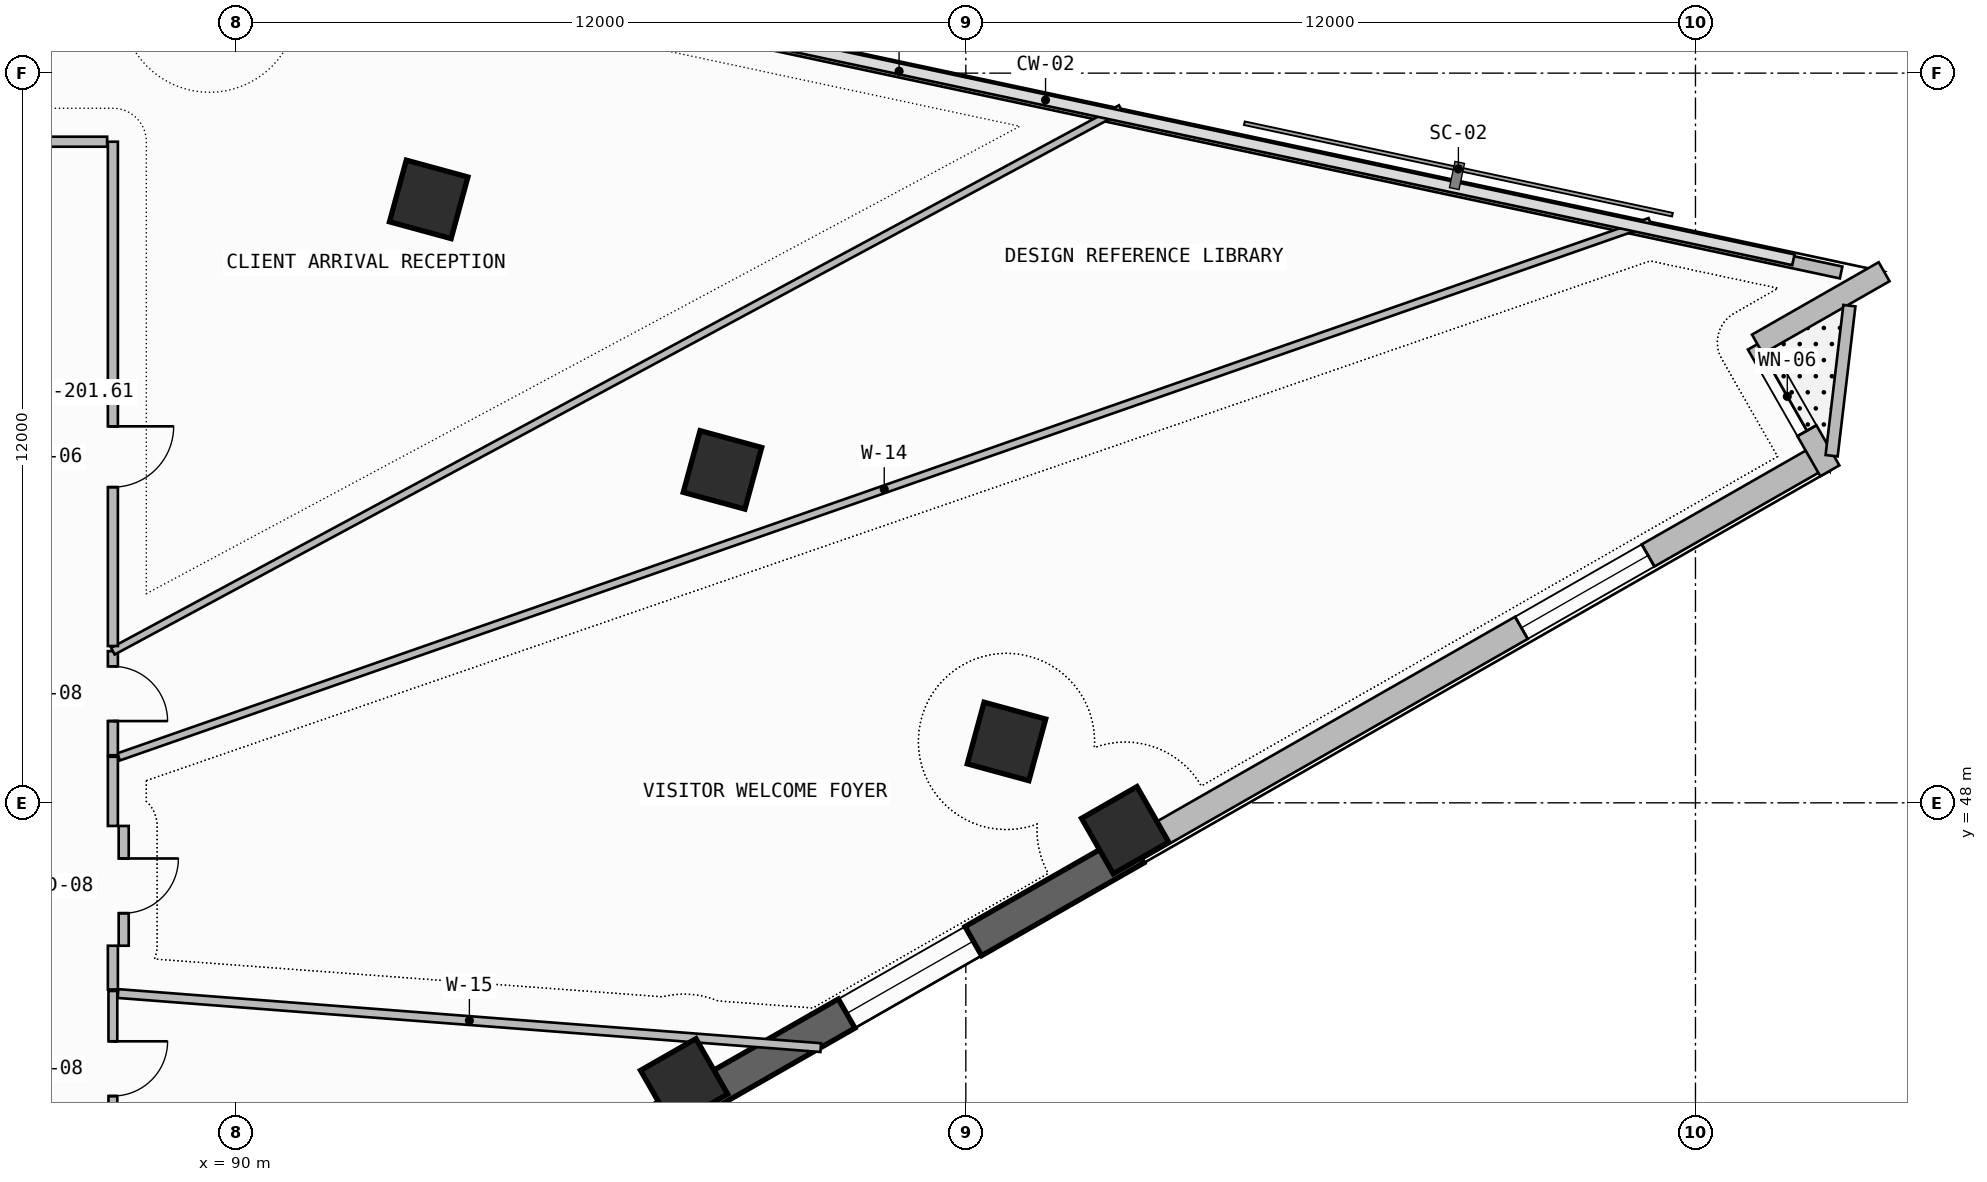
"""IFC4 building model, lengths in metres.
Left out: names, types, materials, properties, quantities, classifications, styles, units other than length and angle.
Written with IfcOpenShell. Run it as: python <this file> out.ifc"""

import sys

from ifc_helpers import new_model, si_unit, direction, frame, frame_2d, origin, origin_2d, place, context, subcontext, project, spatial, rectangle, extrude, element, fill, save


model = new_model("IFC4")
c1 = context("Model", 3, precision=1e-05, world=origin(), true_north=direction((0.0, 1.0)))
c2 = subcontext(c1, "Body", "Model", "MODEL_VIEW")
j1 = project(units=[si_unit("LENGTHUNIT", "METRE"), si_unit("PLANEANGLEUNIT", "RADIAN")], contexts=[c1])
p1 = place(None, origin())
s1 = spatial("IfcSite", under=j1, at=p1, CompositionType="ELEMENT")
p2 = place(p1, origin())
s2 = spatial("IfcBuilding", under=s1, at=p2, CompositionType="ELEMENT")
p3 = place(p2, frame((0.0, 0.0, 218.5)))
s3 = spatial("IfcBuildingStorey", under=s2, at=p3, CompositionType="ELEMENT", Elevation=218.5)
for number, where, z_axis, x_axis in (
    (1, (97.367, 43.405, 0.0), (0.0, 0.0, 1.0), (0.868, 0.496, 0.0)),
    (2, (104.62, 47.55, 0.0), (0.0, 0.0, 1.0), (0.868, 0.496, 0.0)),
    (3, (102.669, 49.01, 0.0), (0.0, 0.0, 1.0), (0.263, 0.965, 0.0)),
    (4, (97.998, 53.475, 0.0), (0.0, 0.0, 1.0), (0.263, 0.965, 0.0)),
    (5, (93.167, 57.924, 0.0), (0.0, 0.0, 1.0), (0.263, 0.965, 0.0)),
):
    element("IfcColumn", number, at=place(p3, frame(where, z_axis=z_axis, x_axis=x_axis)), inside=s3, PredefinedType="COLUMN", context=c2, shape_type="SweptSolid", body=[
        extrude(rectangle(XDim=1.05, YDim=1.05, at=origin_2d()), origin(), (0.0, 0.0, 1.0), 3.52),
    ])
p4 = place(p3, frame((89.479, 38.499, -0.26), z_axis=(0.0, 0.0, 1.0), x_axis=(0.868197136736, 0.496219439123, 0.0)))
e6 = element("IfcWall", 6, at=p4, inside=s3, PredefinedType="SHEAR", context=c2, shape_type="SweptSolid", body=[
    extrude(rectangle(XDim=17.636, YDim=0.55, at=frame_2d((8.818, 0.0))), origin(), (0.0, 0.0, 1.0), 3.52),
])
p5 = place(p4, frame((12.164, 0.0, 1.1)))
e7 = element("IfcOpeningElement", 7, at=p5, cuts=e6, PredefinedType="OPENING", context=c2, shape_type="SweptSolid", body=[
    extrude(rectangle(XDim=2.4, YDim=1.2, at=frame_2d((1.2, 0.6))), frame((0.0, 0.285, 0.0), z_axis=(0.0, -1.0, 0.0), x_axis=(1.0, 0.0, 0.0)), (0.0, 0.0, 1.0), 0.57),
])
p6 = place(p3, frame((104.791, 47.25, 0.0), z_axis=(0.0, 0.0, 1.0), x_axis=(0.868193423982, 0.496225934987, 0.0)))
e8 = element("IfcWall", 8, at=p6, inside=s3, PredefinedType="SOLIDWALL", context=c2, shape_type="SweptSolid", body=[
    extrude(rectangle(XDim=12.995, YDim=0.42, at=frame_2d((6.498, 0.0))), origin(), (0.0, 0.0, 1.0), 2.245),
])
p7 = place(p6, frame((7.31, 0.0, 0.965)))
e9 = element("IfcOpeningElement", 9, at=p7, cuts=e8, PredefinedType="OPENING", context=c2, shape_type="SweptSolid", body=[
    extrude(rectangle(XDim=2.4, YDim=1.2, at=frame_2d((1.2, 0.6))), frame((0.0, 0.22, 0.0), z_axis=(0.0, -1.0, 0.0), x_axis=(1.0, 0.0, 0.0)), (0.0, 0.0, 1.0), 0.44),
])
p8 = place(p3, frame((116.21, 53.46, 0.0), z_axis=(0.0, 0.0, 1.0), x_axis=(-0.496215637313, 0.868199309655, 0.0)))
e10 = element("IfcWall", 10, at=p8, inside=s3, PredefinedType="SOLIDWALL", context=c2, shape_type="SweptSolid", body=[
    extrude(rectangle(XDim=2.399, YDim=0.36, at=frame_2d((1.2, 0.0))), origin(), (0.0, 0.0, 1.0), 3.26),
])
p9 = place(p8, frame((0.76, 0.0, 0.45)))
e11 = element("IfcOpeningElement", 11, at=p9, cuts=e10, PredefinedType="OPENING", context=c2, shape_type="SweptSolid", body=[
    extrude(rectangle(XDim=1.3, YDim=2.4, at=frame_2d((0.65, 1.2))), frame((0.0, 0.19, 0.0), z_axis=(0.0, -1.0, 0.0), x_axis=(1.0, 0.0, 0.0)), (0.0, 0.0, 1.0), 0.38),
])
p10 = place(p3, frame((115.019, 55.543, 0.0), z_axis=(0.0, 0.0, 1.0), x_axis=(0.86818053093, 0.4962484919, 0.0)))
e12 = element("IfcWall", 12, at=p10, inside=s3, PredefinedType="SOLIDWALL", context=c2, shape_type="SweptSolid", body=[
    extrude(rectangle(XDim=2.4, YDim=0.36, at=frame_2d((1.2, 0.0))), origin(), (0.0, 0.0, 1.0), 3.26),
])
p11 = place(p3, frame((116.239, 53.708, 0.0), z_axis=(0.0, 0.0, 1.0), x_axis=(0.117587871261, 0.993062481686, 0.0)))
e13 = element("IfcWall", 13, at=p11, inside=s3, PredefinedType="PARAPET", context=c2, shape_type="SweptSolid", body=[
    extrude(rectangle(XDim=2.485, YDim=0.2, at=frame_2d((1.243, 0.0))), origin(), (0.0, 0.0, 1.0), 1.15),
])
p12 = place(p3, frame((116.396, 56.722, 0.0), z_axis=(0.0, 0.0, 1.0), x_axis=(-0.977936620644, 0.208901809478, 0.0)))
e14 = element("IfcWall", 14, at=p12, inside=s3, PredefinedType="PARAPET", context=c2, shape_type="SweptSolid", body=[
    extrude(rectangle(XDim=31.685, YDim=0.2, at=frame_2d((15.843, 0.0))), origin(), (0.0, 0.0, 1.0), 1.15),
])
p13 = place(p3, frame((87.972, 42.35, 0.0), z_axis=(0.0, 0.0, 1.0), x_axis=(0.0, 1.0, 0.0)))
e15 = element("IfcWall", 15, at=p13, inside=s3, PredefinedType="PARTITIONING", context=c2, shape_type="SweptSolid", body=[
    extrude(rectangle(XDim=2.556, YDim=0.145, at=frame_2d((1.278, 0.0))), origin(), (0.0, 0.0, 1.0), 2.745),
])
p14 = place(p13, frame((0.828, 0.0, 0.0)))
e16 = element("IfcOpeningElement", 16, at=p14, cuts=e15, PredefinedType="OPENING", context=c2, shape_type="SweptSolid", body=[
    extrude(rectangle(XDim=0.9, YDim=2.1, at=frame_2d((0.45, 1.05))), frame((0.0, 0.083, 0.0), z_axis=(0.0, -1.0, 0.0), x_axis=(1.0, 0.0, 0.0)), (0.0, 0.0, 1.0), 0.165),
])
p15 = place(p3, frame((88.057, 44.864, 0.0), z_axis=(0.0, 0.0, 1.0), x_axis=(0.997053618179, -0.07670777324, 0.0)))
e17 = element("IfcWall", 17, at=p15, inside=s3, PredefinedType="PARTITIONING", context=c2, shape_type="SweptSolid", body=[
    extrude(rectangle(XDim=11.592, YDim=0.145, at=frame_2d((5.796, 0.0))), origin(), (0.0, 0.0, 1.0), 2.245),
])
p16 = place(p3, frame((88.15, 45.65, 0.0), z_axis=(0.0, 0.0, 1.0), x_axis=(0.0, 1.0, 0.0)))
e18 = element("IfcWall", 18, at=p16, inside=s3, PredefinedType="PARTITIONING", context=c2, shape_type="SweptSolid", body=[
    extrude(rectangle(XDim=1.97, YDim=0.165, at=frame_2d((0.985, 0.0))), origin(), (0.0, 0.0, 1.0), 3.26),
])
p17 = place(p16, frame((0.535, 0.0, 0.0)))
e19 = element("IfcOpeningElement", 19, at=p17, cuts=e18, PredefinedType="OPENING", context=c2, shape_type="SweptSolid", body=[
    extrude(rectangle(XDim=0.9, YDim=2.1, at=frame_2d((0.45, 1.05))), frame((0.0, 0.093, 0.0), z_axis=(0.0, -1.0, 0.0), x_axis=(1.0, 0.0, 0.0)), (0.0, 0.0, 1.0), 0.185),
])
p18 = place(p3, frame((87.972, 47.62, 0.0), z_axis=(0.0, 0.0, 1.0), x_axis=(0.0, 1.0, 0.0)))
e20 = element("IfcWall", 20, at=p18, inside=s3, PredefinedType="PARTITIONING", context=c2, shape_type="SweptSolid", body=[
    extrude(rectangle(XDim=1.137, YDim=0.165, at=frame_2d((0.568, 0.0))), origin(), (0.0, 0.0, 1.0), 3.26),
])
p19 = place(p3, frame((87.972, 44.93, 0.0), z_axis=(0.0, 0.0, 1.0), x_axis=(0.0, 1.0, 0.0)))
e21 = element("IfcWall", 21, at=p19, inside=s3, PredefinedType="PARTITIONING", context=c2, shape_type="SweptSolid", body=[
    extrude(rectangle(XDim=0.719, YDim=0.165, at=frame_2d((0.36, 0.0))), origin(), (0.0, 0.0, 1.0), 3.26),
])
p20 = place(p3, frame((88.067, 48.755, 0.0), z_axis=(0.0, 0.0, 1.0), x_axis=(0.943999520405, 0.329946822193, 0.0)))
e22 = element("IfcWall", 22, at=p20, inside=s3, PredefinedType="PARTITIONING", context=c2, shape_type="SweptSolid", body=[
    extrude(rectangle(XDim=26.677, YDim=0.125, at=frame_2d((13.338, 0.0))), origin(), (0.0, 0.0, 1.0), 2.645),
])
p21 = place(p3, frame((87.972, 48.782, 0.0), z_axis=(0.0, 0.0, 1.0), x_axis=(0.0, 1.0, 0.0)))
e23 = element("IfcWall", 23, at=p21, inside=s3, PredefinedType="PARTITIONING", context=c2, shape_type="SweptSolid", body=[
    extrude(rectangle(XDim=1.712, YDim=0.165, at=frame_2d((0.856, 0.0))), origin(), (0.0, 0.0, 1.0), 3.26),
])
p22 = place(p21, frame((0.562, 0.0, 0.0)))
e24 = element("IfcOpeningElement", 24, at=p22, cuts=e23, PredefinedType="OPENING", context=c2, shape_type="SweptSolid", body=[
    extrude(rectangle(XDim=0.9, YDim=2.1, at=frame_2d((0.45, 1.05))), frame((0.0, 0.093, 0.0), z_axis=(0.0, -1.0, 0.0), x_axis=(1.0, 0.0, 0.0)), (0.0, 0.0, 1.0), 0.185),
])
p23 = place(p3, frame((87.972, 50.494, 0.0), z_axis=(0.0, 0.0, 1.0), x_axis=(0.880551461311, 0.473950550146, 0.0)))
e25 = element("IfcWall", 25, at=p23, inside=s3, PredefinedType="PARTITIONING", context=c2, shape_type="SweptSolid", body=[
    extrude(rectangle(XDim=18.824, YDim=0.125, at=frame_2d((9.412, 0.0))), origin(), (0.0, 0.0, 1.0), 2.645),
])
p24 = place(p3, frame((87.972, 50.579, 0.0), z_axis=(0.0, 0.0, 1.0), x_axis=(0.0, 1.0, 0.0)))
e26 = element("IfcWall", 26, at=p24, inside=s3, PredefinedType="PARTITIONING", context=c2, shape_type="SweptSolid", body=[
    extrude(rectangle(XDim=8.293, YDim=0.165, at=frame_2d((4.147, 0.0))), origin(), (0.0, 0.0, 1.0), 2.745),
])
p25 = place(p24, frame((2.613, 0.0, 0.0)))
e27 = element("IfcOpeningElement", 27, at=p25, cuts=e26, PredefinedType="OPENING", context=c2, shape_type="SweptSolid", body=[
    extrude(rectangle(XDim=1.0, YDim=2.2, at=frame_2d((0.5, 1.1))), frame((0.0, 0.093, 0.0), z_axis=(0.0, -1.0, 0.0), x_axis=(1.0, 0.0, 0.0)), (0.0, 0.0, 1.0), 0.185),
])
p26 = place(p3, frame((87.878, 58.872, 0.0), z_axis=(0.0, 0.0, 1.0), x_axis=(-1.0, 0.0, 0.0)))
e28 = element("IfcWall", 28, at=p26, inside=s3, PredefinedType="PARTITIONING", context=c2, shape_type="SweptSolid", body=[
    extrude(rectangle(XDim=7.518, YDim=0.165, at=frame_2d((3.759, 0.0))), origin(), (0.0, 0.0, 1.0), 2.745),
])
p27 = place(p5, origin())
e29 = element("IfcWindow", 29, at=p27, inside=s3, PartitioningType="SINGLE_PANEL", PredefinedType="WINDOW", context=c2, shape_type="SweptSolid", body=[
    extrude(rectangle(XDim=2.4, YDim=1.2, at=frame_2d((1.2, 0.6))), frame((0.0, 0.03, 0.0), z_axis=(0.0, -1.0, 0.0), x_axis=(1.0, 0.0, 0.0)), (0.0, 0.0, 1.0), 0.06),
])
fill(e7, e29)
p28 = place(p7, origin())
e30 = element("IfcWindow", 30, at=p28, inside=s3, PartitioningType="SINGLE_PANEL", PredefinedType="WINDOW", context=c2, shape_type="SweptSolid", body=[
    extrude(rectangle(XDim=2.4, YDim=1.2, at=frame_2d((1.2, 0.6))), frame((0.0, 0.03, 0.0), z_axis=(0.0, -1.0, 0.0), x_axis=(1.0, 0.0, 0.0)), (0.0, 0.0, 1.0), 0.06),
])
fill(e9, e30)
p29 = place(p9, origin())
e31 = element("IfcWindow", 31, at=p29, inside=s3, PartitioningType="SINGLE_PANEL", PredefinedType="WINDOW", context=c2, shape_type="SweptSolid", body=[
    extrude(rectangle(XDim=1.3, YDim=2.4, at=frame_2d((0.65, 1.2))), frame((0.0, 0.03, 0.0), z_axis=(0.0, -1.0, 0.0), x_axis=(1.0, 0.0, 0.0)), (0.0, 0.0, 1.0), 0.06),
])
fill(e11, e31)
p30 = place(p14, frame((0.9, 0.0, 0.0), z_axis=(0.0, 0.0, 1.0), x_axis=(-1.0, 0.0, 0.0)))
e32 = element("IfcDoor", 32, at=p30, inside=s3, OperationType="SINGLE_SWING_LEFT", PredefinedType="DOOR", context=c2, shape_type="SweptSolid", body=[
    extrude(rectangle(XDim=0.9, YDim=2.1, at=frame_2d((0.45, 1.05))), frame((0.0, 0.025, 0.0), z_axis=(0.0, -1.0, 0.0), x_axis=(1.0, 0.0, 0.0)), (0.0, 0.0, 1.0), 0.05),
])
fill(e16, e32)
p31 = place(p17, frame((0.9, 0.0, 0.0), z_axis=(0.0, 0.0, 1.0), x_axis=(-1.0, 0.0, 0.0)))
e33 = element("IfcDoor", 33, at=p31, inside=s3, OperationType="SINGLE_SWING_LEFT", PredefinedType="DOOR", context=c2, shape_type="SweptSolid", body=[
    extrude(rectangle(XDim=0.9, YDim=2.1, at=frame_2d((0.45, 1.05))), frame((0.0, 0.025, 0.0), z_axis=(0.0, -1.0, 0.0), x_axis=(1.0, 0.0, 0.0)), (0.0, 0.0, 1.0), 0.05),
])
fill(e19, e33)
p32 = place(p22, frame((0.9, 0.0, 0.0), z_axis=(0.0, 0.0, 1.0), x_axis=(-1.0, 0.0, 0.0)))
e34 = element("IfcDoor", 34, at=p32, inside=s3, OperationType="SINGLE_SWING_RIGHT", PredefinedType="DOOR", context=c2, shape_type="SweptSolid", body=[
    extrude(rectangle(XDim=0.9, YDim=2.1, at=frame_2d((0.45, 1.05))), frame((0.0, 0.025, 0.0), z_axis=(0.0, -1.0, 0.0), x_axis=(1.0, 0.0, 0.0)), (0.0, 0.0, 1.0), 0.05),
])
fill(e24, e34)
p33 = place(p25, frame((1.0, 0.0, 0.0), z_axis=(0.0, 0.0, 1.0), x_axis=(-1.0, 0.0, 0.0)))
e35 = element("IfcDoor", 35, at=p33, inside=s3, OperationType="SINGLE_SWING_LEFT", PredefinedType="DOOR", context=c2, shape_type="SweptSolid", body=[
    extrude(rectangle(XDim=1.0, YDim=2.2, at=frame_2d((0.5, 1.1))), frame((0.0, 0.025, 0.0), z_axis=(0.0, -1.0, 0.0), x_axis=(1.0, 0.0, 0.0)), (0.0, 0.0, 1.0), 0.05),
])
fill(e27, e35)
save(model, sys.argv[1])
